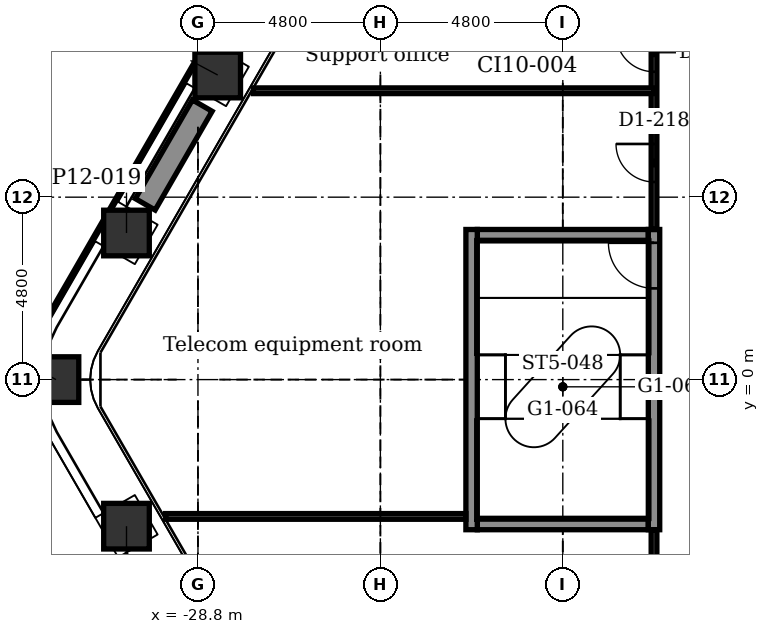
"""IFC4 building model, lengths in metres.
Left out: names, types, materials, properties, quantities, classifications, styles, units other than length and angle.
Written with IfcOpenShell. Run it as: python <this file> out.ifc"""

import sys

from ifc_helpers import new_model, si_unit, direction, frame, frame_2d, origin, origin_2d, place, context, subcontext, project, spatial, rectangle, extrude, element, fill, save


model = new_model("IFC4")
c1 = context("Model", 3, precision=1e-05, world=origin(), true_north=direction((0.0, 1.0)))
c2 = subcontext(c1, "Body", "Model", "MODEL_VIEW")
j1 = project(units=[si_unit("LENGTHUNIT", "METRE"), si_unit("PLANEANGLEUNIT", "RADIAN")], contexts=[c1])
p1 = place(None, origin())
s1 = spatial("IfcSite", under=j1, at=p1, CompositionType="ELEMENT")
p2 = place(p1, origin())
s2 = spatial("IfcBuilding", under=s1, at=p2, CompositionType="ELEMENT")
p3 = place(p2, frame((0.0, 0.0, 77.9)))
s3 = spatial("IfcBuildingStorey", under=s2, at=p3, CompositionType="ELEMENT", Elevation=77.9)
for number, where, z_axis, x_axis in (
    (1, (-30.68, -3.857, -0.2), (0.0, 0.0, 1.0), (0.866, 0.5, 0.0)),
    (2, (-32.536, 0.0, -0.2), (0.0, 0.0, 1.0), (1.0, 0.0, 0.0)),
    (3, (-30.68, 3.857, -0.2), (0.0, 0.0, 1.0), (0.5, 0.866, 0.0)),
    (4, (-28.28, 8.014, -0.2), (0.0, 0.0, 1.0), (0.5, 0.866, 0.0)),
):
    element("IfcColumn", number, at=place(p3, frame(where, z_axis=z_axis, x_axis=x_axis)), inside=s3, PredefinedType="COLUMN", context=c2, shape_type="SweptSolid", body=[
        extrude(rectangle(XDim=1.2, YDim=1.2, at=origin_2d()), origin(), (0.0, 0.0, 1.0), 4.5),
    ])
for number, where, z_axis, x_axis in (
    (5, (-21.45, -3.8, -0.2), (0.0, 0.0, 1.0), (1.0, 0.0, 0.0)),
    (6, (-21.45, 3.8, -0.2), (0.0, 0.0, 1.0), (1.0, 0.0, 0.0)),
):
    element("IfcWall", number, at=place(p3, frame(where, z_axis=z_axis, x_axis=x_axis)), inside=s3, PredefinedType="STANDARD", context=c2, shape_type="SweptSolid", body=[
        extrude(rectangle(XDim=4.5, YDim=0.3, at=frame_2d((2.25, 0.0))), origin(), (0.0, 0.0, 1.0), 4.5),
    ])
p4 = place(p3, frame((-21.6, -3.95, -0.2), z_axis=(0.0, 0.0, 1.0), x_axis=(0.0, 1.0, 0.0)))
e7 = element("IfcWall", 7, at=p4, inside=s3, PredefinedType="STANDARD", context=c2, shape_type="SweptSolid", body=[
    extrude(rectangle(XDim=7.9, YDim=0.3, at=frame_2d((3.95, 0.0))), origin(), (0.0, 0.0, 1.0), 4.5),
])
p5 = place(p3, frame((-16.8, -3.95, -0.2), z_axis=(0.0, 0.0, 1.0), x_axis=(0.0, 1.0, 0.0)))
e8 = element("IfcWall", 8, at=p5, inside=s3, PredefinedType="STANDARD", context=c2, shape_type="SweptSolid", body=[
    extrude(rectangle(XDim=7.9, YDim=0.3, at=frame_2d((3.95, 0.0))), origin(), (0.0, 0.0, 1.0), 4.5),
])
p6 = place(p5, frame((6.35, 0.0, 0.2)))
e9 = element("IfcOpeningElement", 9, at=p6, cuts=e8, PredefinedType="OPENING", context=c2, shape_type="SweptSolid", body=[
    extrude(rectangle(XDim=1.2, YDim=2.1, at=frame_2d((0.6, 1.05))), frame((0.0, 0.16, 0.0), z_axis=(0.0, -1.0, 0.0), x_axis=(1.0, 0.0, 0.0)), (0.0, 0.0, 1.0), 0.32),
])
p7 = place(p3, frame((-30.187, 4.611, 0.0), z_axis=(0.0, 0.0, 1.0), x_axis=(0.499990139034, 0.866031096941, 0.0)))
e10 = element("IfcWall", 10, at=p7, inside=s3, PredefinedType="USERDEFINED", context=c2, shape_type="SweptSolid", body=[
    extrude(rectangle(XDim=3.0, YDim=0.6, at=frame_2d((1.5, 0.0))), origin(), (0.0, 0.0, 1.0), 0.7),
])
p8 = place(p3, frame((-16.8, -13.0, 0.0), z_axis=(0.0, 0.0, 1.0), x_axis=(0.0, 1.0, 0.0)))
e11 = element("IfcWall", 11, at=p8, inside=s3, PredefinedType="PARTITIONING", context=c2, shape_type="SweptSolid", body=[
    extrude(rectangle(XDim=9.05, YDim=0.15, at=frame_2d((4.525, 0.0))), origin(), (0.0, 0.0, 1.0), 4.3),
])
p9 = place(p8, frame((1.0, 0.0, 0.0)))
e12 = element("IfcOpeningElement", 12, at=p9, cuts=e11, PredefinedType="OPENING", context=c2, shape_type="SweptSolid", body=[
    extrude(rectangle(XDim=1.0, YDim=2.1, at=frame_2d((0.5, 1.05))), frame((0.0, 0.085, 0.0), z_axis=(0.0, -1.0, 0.0), x_axis=(1.0, 0.0, 0.0)), (0.0, 0.0, 1.0), 0.17),
])
p10 = place(p8, frame((5.8, 0.0, 0.0)))
e13 = element("IfcOpeningElement", 13, at=p10, cuts=e11, PredefinedType="OPENING", context=c2, shape_type="SweptSolid", body=[
    extrude(rectangle(XDim=1.0, YDim=2.1, at=frame_2d((0.5, 1.05))), frame((0.0, 0.085, 0.0), z_axis=(0.0, -1.0, 0.0), x_axis=(1.0, 0.0, 0.0)), (0.0, 0.0, 1.0), 0.17),
])
p11 = place(p3, frame((-16.8, 3.95, 0.0), z_axis=(0.0, 0.0, 1.0), x_axis=(0.0, 1.0, 0.0)))
e14 = element("IfcWall", 14, at=p11, inside=s3, PredefinedType="PARTITIONING", context=c2, shape_type="SweptSolid", body=[
    extrude(rectangle(XDim=9.65, YDim=0.15, at=frame_2d((4.825, 0.0))), origin(), (0.0, 0.0, 1.0), 4.3),
])
p12 = place(p11, frame((1.25, 0.0, 0.0)))
e15 = element("IfcOpeningElement", 15, at=p12, cuts=e14, PredefinedType="OPENING", context=c2, shape_type="SweptSolid", body=[
    extrude(rectangle(XDim=1.0, YDim=2.1, at=frame_2d((0.5, 1.05))), frame((0.0, 0.085, 0.0), z_axis=(0.0, -1.0, 0.0), x_axis=(1.0, 0.0, 0.0)), (0.0, 0.0, 1.0), 0.17),
])
p13 = place(p11, frame((4.15, 0.0, 0.0)))
e16 = element("IfcOpeningElement", 16, at=p13, cuts=e14, PredefinedType="OPENING", context=c2, shape_type="SweptSolid", body=[
    extrude(rectangle(XDim=1.0, YDim=2.1, at=frame_2d((0.5, 1.05))), frame((0.0, 0.085, 0.0), z_axis=(0.0, -1.0, 0.0), x_axis=(1.0, 0.0, 0.0)), (0.0, 0.0, 1.0), 0.17),
])
p14 = place(p11, frame((7.35, 0.0, 0.0)))
e17 = element("IfcOpeningElement", 17, at=p14, cuts=e14, PredefinedType="OPENING", context=c2, shape_type="SweptSolid", body=[
    extrude(rectangle(XDim=1.0, YDim=2.1, at=frame_2d((0.5, 1.05))), frame((0.0, 0.085, 0.0), z_axis=(0.0, -1.0, 0.0), x_axis=(1.0, 0.0, 0.0)), (0.0, 0.0, 1.0), 0.17),
])
p15 = place(p3, frame((-29.651, -3.6, 0.0), z_axis=(0.0, 0.0, 1.0), x_axis=(1.0, 0.0, 0.0)))
e18 = element("IfcWall", 18, at=p15, inside=s3, PredefinedType="PARTITIONING", context=c2, shape_type="SweptSolid", body=[
    extrude(rectangle(XDim=7.901, YDim=0.15, at=frame_2d((3.95, 0.0))), origin(), (0.0, 0.0, 1.0), 4.3),
])
p16 = place(p3, frame((-27.342, 7.6, 0.0), z_axis=(0.0, 0.0, 1.0), x_axis=(1.0, 0.0, 0.0)))
e19 = element("IfcWall", 19, at=p16, inside=s3, PredefinedType="PARTITIONING", context=c2, shape_type="SweptSolid", body=[
    extrude(rectangle(XDim=10.542, YDim=0.15, at=frame_2d((5.271, 0.0))), origin(), (0.0, 0.0, 1.0), 4.3),
])
p17 = place(p12, origin())
e20 = element("IfcDoor", 20, at=p17, inside=s3, OperationType="SINGLE_SWING_RIGHT", PredefinedType="DOOR", context=c2, shape_type="SweptSolid", body=[
    extrude(rectangle(XDim=1.0, YDim=2.1, at=frame_2d((0.5, 1.05))), frame((0.0, 0.025, 0.0), z_axis=(0.0, -1.0, 0.0), x_axis=(1.0, 0.0, 0.0)), (0.0, 0.0, 1.0), 0.05),
])
fill(e15, e20)
p18 = place(p13, origin())
e21 = element("IfcDoor", 21, at=p18, inside=s3, OperationType="SINGLE_SWING_RIGHT", PredefinedType="DOOR", context=c2, shape_type="SweptSolid", body=[
    extrude(rectangle(XDim=1.0, YDim=2.1, at=frame_2d((0.5, 1.05))), frame((0.0, 0.025, 0.0), z_axis=(0.0, -1.0, 0.0), x_axis=(1.0, 0.0, 0.0)), (0.0, 0.0, 1.0), 0.05),
])
fill(e16, e21)
p19 = place(p6, origin())
e22 = element("IfcDoor", 22, at=p19, inside=s3, OperationType="SINGLE_SWING_RIGHT", PredefinedType="DOOR", context=c2, shape_type="SweptSolid", body=[
    extrude(rectangle(XDim=1.2, YDim=2.1, at=frame_2d((0.6, 1.05))), frame((0.0, 0.025, 0.0), z_axis=(0.0, -1.0, 0.0), x_axis=(1.0, 0.0, 0.0)), (0.0, 0.0, 1.0), 0.05),
])
fill(e9, e22)
save(model, sys.argv[1])
